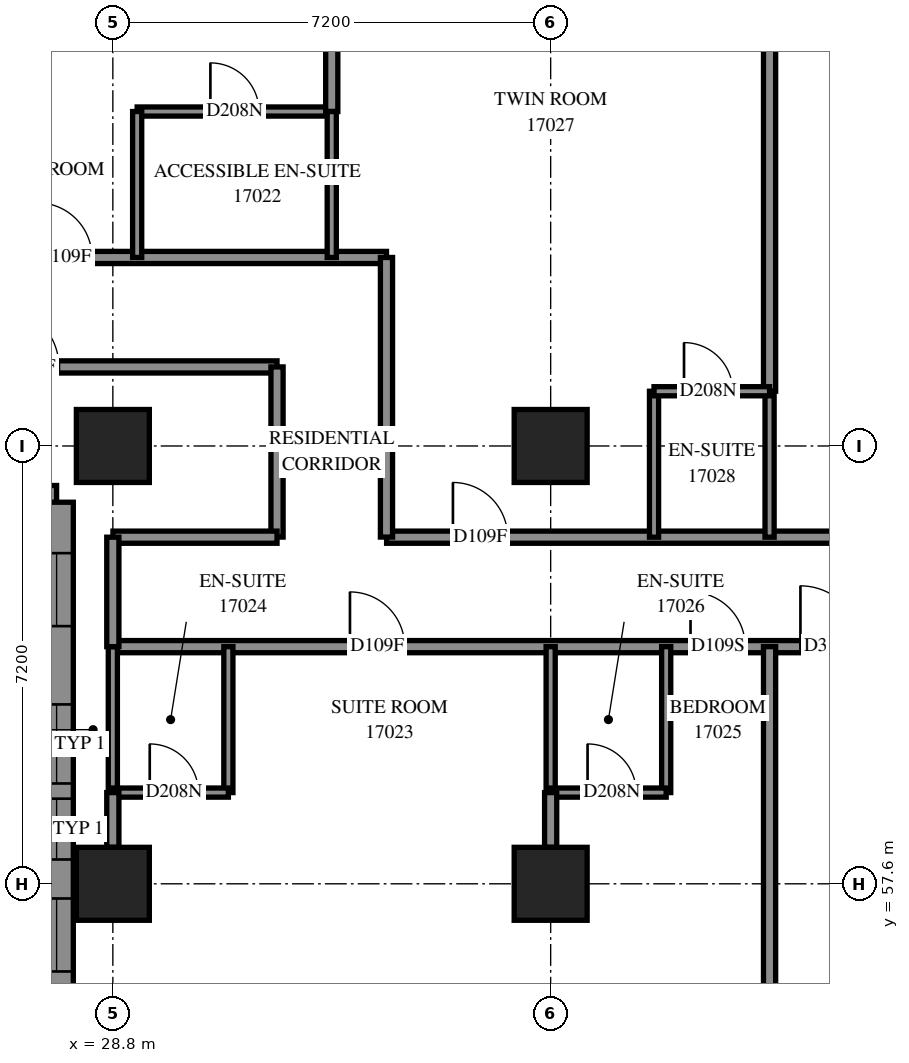
"""IFC4 building model, lengths in metres.
Left out: names, types, materials, properties, quantities, classifications, styles, units other than length and angle.
Written with IfcOpenShell. Run it as: python <this file> out.ifc"""

import sys

from ifc_helpers import new_model, si_unit, direction, frame, frame_2d, origin, origin_2d, place, context, subcontext, project, spatial, polyline, rectangle, outline, extrude, element, fill, save


model = new_model("IFC4")
c1 = context("Model", 3, precision=1e-05, world=origin(), true_north=direction((0.0, 1.0)))
c2 = subcontext(c1, "Body", "Model", "MODEL_VIEW")
j1 = project(units=[si_unit("LENGTHUNIT", "METRE"), si_unit("PLANEANGLEUNIT", "RADIAN")], contexts=[c1])
p1 = place(None, origin())
s1 = spatial("IfcSite", under=j1, at=p1, CompositionType="ELEMENT")
p2 = place(p1, origin())
s2 = spatial("IfcBuilding", under=s1, at=p2, CompositionType="ELEMENT")
p3 = place(p2, frame((0.0, 0.0, 64.4)))
s3 = spatial("IfcBuildingStorey", under=s2, at=p3, CompositionType="ELEMENT", Elevation=64.4)
for number, where, z_axis, x_axis in (
    (1, (28.8, 57.6, 0.0), (0.0, 0.0, 1.0), (1.0, 0.0, 0.0)),
    (2, (28.8, 64.8, 0.0), (0.0, 0.0, 1.0), (1.0, 0.0, 0.0)),
    (3, (36.0, 57.6, 0.0), (0.0, 0.0, 1.0), (1.0, 0.0, 0.0)),
    (4, (36.0, 64.8, 0.0), (0.0, 0.0, 1.0), (1.0, 0.0, 0.0)),
):
    element("IfcColumn", number, at=place(p3, frame(where, z_axis=z_axis, x_axis=x_axis)), inside=s3, PredefinedType="COLUMN", context=c2, shape_type="SweptSolid", body=[
        extrude(rectangle(XDim=1.2, YDim=1.2, at=origin_2d()), origin(), (0.0, 0.0, 1.0), 3.1),
    ])
p4 = place(p3, frame((19.442, 63.875, 0.0), z_axis=(0.0, 0.0, 1.0), x_axis=(1.0, 0.0, 0.0)))
e5 = element("IfcWall", 5, at=p4, inside=s3, PredefinedType="SOLIDWALL", context=c2, shape_type="SweptSolid", body=[
    extrude(outline(polyline([(-0.275, -0.275), (8.158, -0.275), (8.708, 0.275), (0.275, 0.275), (-0.275, -0.275)])), origin(), (0.0, 0.0, 1.0), 3.1),
])
p5 = place(p4, frame((2.558, 0.0, 0.5)))
e6 = element("IfcOpeningElement", 6, at=p5, cuts=e5, PredefinedType="OPENING", context=c2, shape_type="SweptSolid", body=[
    extrude(rectangle(XDim=2.8, YDim=2.45, at=frame_2d((1.4, 1.225))), frame((0.0, 0.285, 0.0), z_axis=(0.0, -1.0, 0.0), x_axis=(1.0, 0.0, 0.0)), (0.0, 0.0, 1.0), 0.57),
])
p6 = place(p4, frame((0.717, 0.0, 0.5)))
e7 = element("IfcOpeningElement", 7, at=p6, cuts=e5, PredefinedType="OPENING", context=c2, shape_type="SweptSolid", body=[
    extrude(rectangle(XDim=1.2, YDim=2.45, at=frame_2d((0.6, 1.225))), frame((0.0, 0.285, 0.0), z_axis=(0.0, -1.0, 0.0), x_axis=(1.0, 0.0, 0.0)), (0.0, 0.0, 1.0), 0.57),
])
p7 = place(p4, frame((6.396, 0.0, 0.5)))
e8 = element("IfcOpeningElement", 8, at=p7, cuts=e5, PredefinedType="OPENING", context=c2, shape_type="SweptSolid", body=[
    extrude(rectangle(XDim=1.2, YDim=2.45, at=frame_2d((0.6, 1.225))), frame((0.0, 0.285, 0.0), z_axis=(0.0, -1.0, 0.0), x_axis=(1.0, 0.0, 0.0)), (0.0, 0.0, 1.0), 0.57),
])
p8 = place(p3, frame((27.875, 63.875, 0.0), z_axis=(0.0, 0.0, 1.0), x_axis=(0.0, -1.0, 0.0)))
e9 = element("IfcWall", 9, at=p8, inside=s3, PredefinedType="SOLIDWALL", context=c2, shape_type="SweptSolid", body=[
    extrude(outline(polyline([(0.275, -0.275), (8.708, -0.275), (8.158, 0.275), (-0.275, 0.275), (0.275, -0.275)])), origin(), (0.0, 0.0, 1.0), 3.1),
])
p9 = place(p8, frame((0.838, 0.0, 0.5)))
e10 = element("IfcOpeningElement", 10, at=p9, cuts=e9, PredefinedType="OPENING", context=c2, shape_type="SweptSolid", body=[
    extrude(rectangle(XDim=1.2, YDim=2.45, at=frame_2d((0.6, 1.225))), frame((0.0, 0.285, 0.0), z_axis=(0.0, -1.0, 0.0), x_axis=(1.0, 0.0, 0.0)), (0.0, 0.0, 1.0), 0.57),
])
p10 = place(p8, frame((6.516, 0.0, 0.5)))
e11 = element("IfcOpeningElement", 11, at=p10, cuts=e9, PredefinedType="OPENING", context=c2, shape_type="SweptSolid", body=[
    extrude(rectangle(XDim=1.2, YDim=2.45, at=frame_2d((0.6, 1.225))), frame((0.0, 0.285, 0.0), z_axis=(0.0, -1.0, 0.0), x_axis=(1.0, 0.0, 0.0)), (0.0, 0.0, 1.0), 0.57),
])
p11 = place(p8, frame((3.325, 0.0, 0.45)))
e12 = element("IfcOpeningElement", 12, at=p11, cuts=e9, PredefinedType="OPENING", context=c2, shape_type="SweptSolid", body=[
    extrude(rectangle(XDim=1.3, YDim=2.5, at=frame_2d((0.65, 1.25))), frame((0.0, 0.285, 0.0), z_axis=(0.0, -1.0, 0.0), x_axis=(1.0, 0.0, 0.0)), (0.0, 0.0, 1.0), 0.57),
])
p12 = place(p8, frame((4.875, 0.0, 0.45)))
e13 = element("IfcOpeningElement", 13, at=p12, cuts=e9, PredefinedType="OPENING", context=c2, shape_type="SweptSolid", body=[
    extrude(rectangle(XDim=1.0, YDim=2.5, at=frame_2d((0.5, 1.25))), frame((0.0, 0.285, 0.0), z_axis=(0.0, -1.0, 0.0), x_axis=(1.0, 0.0, 0.0)), (0.0, 0.0, 1.0), 0.57),
])
p13 = place(p3, frame((28.8, 61.5, 0.0), z_axis=(0.0, 0.0, 1.0), x_axis=(1.0, 0.0, 0.0)))
e14 = element("IfcWall", 14, at=p13, inside=s3, PredefinedType="PARTITIONING", context=c2, shape_type="SweptSolid", body=[
    extrude(rectangle(XDim=24.3, YDim=0.2, at=frame_2d((12.15, 0.0))), origin(), (0.0, 0.0, 1.0), 3.1),
])
p14 = place(p13, frame((3.899, 0.0, 0.0)))
e15 = element("IfcOpeningElement", 15, at=p14, cuts=e14, PredefinedType="OPENING", context=c2, shape_type="SweptSolid", body=[
    extrude(rectangle(XDim=0.9, YDim=2.1, at=frame_2d((0.45, 1.05))), frame((0.0, 0.11, 0.0), z_axis=(0.0, -1.0, 0.0), x_axis=(1.0, 0.0, 0.0)), (0.0, 0.0, 1.0), 0.22),
])
p15 = place(p13, frame((9.5, 0.0, 0.0)))
e16 = element("IfcOpeningElement", 16, at=p15, cuts=e14, PredefinedType="OPENING", context=c2, shape_type="SweptSolid", body=[
    extrude(rectangle(XDim=0.9, YDim=2.1, at=frame_2d((0.45, 1.05))), frame((0.0, 0.11, 0.0), z_axis=(0.0, -1.0, 0.0), x_axis=(1.0, 0.0, 0.0)), (0.0, 0.0, 1.0), 0.22),
])
p16 = place(p13, frame((11.307, 0.0, 0.0)))
e17 = element("IfcOpeningElement", 17, at=p16, cuts=e14, PredefinedType="OPENING", context=c2, shape_type="SweptSolid", body=[
    extrude(rectangle(XDim=1.0, YDim=2.1, at=frame_2d((0.5, 1.05))), frame((0.0, 0.11, 0.0), z_axis=(0.0, -1.0, 0.0), x_axis=(1.0, 0.0, 0.0)), (0.0, 0.0, 1.0), 0.22),
])
p17 = place(p13, frame((16.7, 0.0, 0.0)))
e18 = element("IfcOpeningElement", 18, at=p17, cuts=e14, PredefinedType="OPENING", context=c2, shape_type="SweptSolid", body=[
    extrude(rectangle(XDim=0.9, YDim=2.1, at=frame_2d((0.45, 1.05))), frame((0.0, 0.11, 0.0), z_axis=(0.0, -1.0, 0.0), x_axis=(1.0, 0.0, 0.0)), (0.0, 0.0, 1.0), 0.22),
])
p18 = place(p13, frame((18.508, 0.0, 0.0)))
e19 = element("IfcOpeningElement", 19, at=p18, cuts=e14, PredefinedType="OPENING", context=c2, shape_type="SweptSolid", body=[
    extrude(rectangle(XDim=1.0, YDim=2.1, at=frame_2d((0.5, 1.05))), frame((0.0, 0.11, 0.0), z_axis=(0.0, -1.0, 0.0), x_axis=(1.0, 0.0, 0.0)), (0.0, 0.0, 1.0), 0.22),
])
p19 = place(p13, frame((23.033, 0.0, 0.0)))
e20 = element("IfcOpeningElement", 20, at=p19, cuts=e14, PredefinedType="OPENING", context=c2, shape_type="SweptSolid", body=[
    extrude(rectangle(XDim=1.0, YDim=2.1, at=frame_2d((0.5, 1.05))), frame((0.0, 0.11, 0.0), z_axis=(0.0, -1.0, 0.0), x_axis=(1.0, 0.0, 0.0)), (0.0, 0.0, 1.0), 0.22),
])
p20 = place(p3, frame((33.302, 63.3, 0.0), z_axis=(0.0, 0.0, 1.0), x_axis=(1.0, 0.0, 0.0)))
e21 = element("IfcWall", 21, at=p20, inside=s3, PredefinedType="PARTITIONING", context=c2, shape_type="SweptSolid", body=[
    extrude(rectangle(XDim=21.798, YDim=0.2, at=frame_2d((10.899, 0.0))), origin(), (0.0, 0.0, 1.0), 3.1),
])
p21 = place(p20, frame((1.091, 0.0, 0.0)))
e22 = element("IfcOpeningElement", 22, at=p21, cuts=e21, PredefinedType="OPENING", context=c2, shape_type="SweptSolid", body=[
    extrude(rectangle(XDim=0.9, YDim=2.1, at=frame_2d((0.45, 1.05))), frame((0.0, 0.11, 0.0), z_axis=(0.0, -1.0, 0.0), x_axis=(1.0, 0.0, 0.0)), (0.0, 0.0, 1.0), 0.22),
])
p22 = place(p20, frame((8.248, 0.0, 0.0)))
e23 = element("IfcOpeningElement", 23, at=p22, cuts=e21, PredefinedType="OPENING", context=c2, shape_type="SweptSolid", body=[
    extrude(rectangle(XDim=0.9, YDim=2.1, at=frame_2d((0.45, 1.05))), frame((0.0, 0.11, 0.0), z_axis=(0.0, -1.0, 0.0), x_axis=(1.0, 0.0, 0.0)), (0.0, 0.0, 1.0), 0.22),
])
p23 = place(p20, frame((15.448, 0.0, 0.0)))
e24 = element("IfcOpeningElement", 24, at=p23, cuts=e21, PredefinedType="OPENING", context=c2, shape_type="SweptSolid", body=[
    extrude(rectangle(XDim=0.9, YDim=2.1, at=frame_2d((0.45, 1.05))), frame((0.0, 0.11, 0.0), z_axis=(0.0, -1.0, 0.0), x_axis=(1.0, 0.0, 0.0)), (0.0, 0.0, 1.0), 0.22),
])
p24 = place(p3, frame((21.602, 67.9, 0.0), z_axis=(0.0, 0.0, 1.0), x_axis=(1.0, 0.0, 0.0)))
e25 = element("IfcWall", 25, at=p24, inside=s3, PredefinedType="PARTITIONING", context=c2, shape_type="SweptSolid", body=[
    extrude(rectangle(XDim=11.698, YDim=0.2, at=frame_2d((5.849, 0.0))), origin(), (0.0, 0.0, 1.0), 3.1),
])
p25 = place(p24, frame((5.955, 0.0, 0.0)))
e26 = element("IfcOpeningElement", 26, at=p25, cuts=e25, PredefinedType="OPENING", context=c2, shape_type="SweptSolid", body=[
    extrude(rectangle(XDim=0.9, YDim=2.1, at=frame_2d((0.45, 1.05))), frame((0.0, 0.11, 0.0), z_axis=(0.0, -1.0, 0.0), x_axis=(1.0, 0.0, 0.0)), (0.0, 0.0, 1.0), 0.22),
])
p26 = place(p3, frame((21.6, 66.1, 0.0), z_axis=(0.0, 0.0, 1.0), x_axis=(1.0, 0.0, 0.0)))
e27 = element("IfcWall", 27, at=p26, inside=s3, PredefinedType="PARTITIONING", context=c2, shape_type="SweptSolid", body=[
    extrude(rectangle(XDim=9.9, YDim=0.2, at=frame_2d((4.95, 0.0))), origin(), (0.0, 0.0, 1.0), 3.1),
])
p27 = place(p26, frame((5.314, 0.0, 0.0)))
e28 = element("IfcOpeningElement", 28, at=p27, cuts=e27, PredefinedType="OPENING", context=c2, shape_type="SweptSolid", body=[
    extrude(rectangle(XDim=1.0, YDim=2.1, at=frame_2d((0.5, 1.05))), frame((0.0, 0.11, 0.0), z_axis=(0.0, -1.0, 0.0), x_axis=(1.0, 0.0, 0.0)), (0.0, 0.0, 1.0), 0.22),
])
p28 = place(p3, frame((39.6, 65.7, 0.0), z_axis=(0.0, 0.0, 1.0), x_axis=(0.0, 1.0, 0.0)))
e29 = element("IfcWall", 29, at=p28, inside=s3, PredefinedType="PARTITIONING", context=c2, shape_type="SweptSolid", body=[
    extrude(rectangle(XDim=7.168, YDim=0.2, at=frame_2d((3.584, 0.0))), origin(), (0.0, 0.0, 1.0), 3.1),
])
p29 = place(p3, frame((39.6, 55.717, 0.0), z_axis=(0.0, 0.0, 1.0), x_axis=(0.0, 1.0, 0.0)))
e30 = element("IfcWall", 30, at=p29, inside=s3, PredefinedType="PARTITIONING", context=c2, shape_type="SweptSolid", body=[
    extrude(rectangle(XDim=5.783, YDim=0.2, at=frame_2d((2.892, 0.0))), origin(), (0.0, 0.0, 1.0), 3.1),
])
p30 = place(p3, frame((33.3, 63.302, 0.0), z_axis=(0.0, 0.0, 1.0), x_axis=(0.0, 1.0, 0.0)))
e31 = element("IfcWall", 31, at=p30, inside=s3, PredefinedType="PARTITIONING", context=c2, shape_type="SweptSolid", body=[
    extrude(rectangle(XDim=4.598, YDim=0.2, at=frame_2d((2.299, 0.0))), origin(), (0.0, 0.0, 1.0), 3.1),
])
p31 = place(p3, frame((29.2, 70.3, 0.0), z_axis=(0.0, 0.0, 1.0), x_axis=(1.0, 0.0, 0.0)))
e32 = element("IfcWall", 32, at=p31, inside=s3, PredefinedType="PARTITIONING", context=c2, shape_type="SweptSolid", body=[
    extrude(rectangle(XDim=3.2, YDim=0.15, at=frame_2d((1.6, 0.0))), origin(), (0.0, 0.0, 1.0), 3.1),
])
p32 = place(p31, frame((1.204, 0.0, 0.0)))
e33 = element("IfcOpeningElement", 33, at=p32, cuts=e32, PredefinedType="OPENING", context=c2, shape_type="SweptSolid", body=[
    extrude(rectangle(XDim=0.8, YDim=2.1, at=frame_2d((0.4, 1.05))), frame((0.0, 0.085, 0.0), z_axis=(0.0, -1.0, 0.0), x_axis=(1.0, 0.0, 0.0)), (0.0, 0.0, 1.0), 0.17),
])
p33 = place(p3, frame((31.5, 63.302, 0.0), z_axis=(0.0, 0.0, 1.0), x_axis=(0.0, 1.0, 0.0)))
e34 = element("IfcWall", 34, at=p33, inside=s3, PredefinedType="PARTITIONING", context=c2, shape_type="SweptSolid", body=[
    extrude(rectangle(XDim=2.798, YDim=0.2, at=frame_2d((1.399, 0.0))), origin(), (0.0, 0.0, 1.0), 3.1),
])
p34 = place(p3, frame((28.802, 63.3, 0.0), z_axis=(0.0, 0.0, 1.0), x_axis=(1.0, 0.0, 0.0)))
e35 = element("IfcWall", 35, at=p34, inside=s3, PredefinedType="PARTITIONING", context=c2, shape_type="SweptSolid", body=[
    extrude(rectangle(XDim=2.698, YDim=0.2, at=frame_2d((1.349, 0.0))), origin(), (0.0, 0.0, 1.0), 3.1),
])
p35 = place(p3, frame((32.4, 70.3, 0.0), z_axis=(0.0, 0.0, 1.0), x_axis=(0.0, 1.0, 0.0)))
e36 = element("IfcWall", 36, at=p35, inside=s3, PredefinedType="PARTITIONING", context=c2, shape_type="SweptSolid", body=[
    extrude(rectangle(XDim=2.639, YDim=0.2, at=frame_2d((1.32, 0.0))), origin(), (0.0, 0.0, 1.0), 3.1),
])
for number, where, z_axis, x_axis in (
    (37, (37.7, 63.3, 0.0), (0.0, 0.0, 1.0), (0.0, 1.0, 0.0)),
    (38, (39.6, 63.3, 0.0), (0.0, 0.0, 1.0), (0.0, 1.0, 0.0)),
    (39, (30.7, 59.1, 0.0), (0.0, 0.0, 1.0), (0.0, 1.0, 0.0)),
):
    element("IfcWall", number, at=place(p3, frame(where, z_axis=z_axis, x_axis=x_axis)), inside=s3, PredefinedType="PARTITIONING", context=c2, shape_type="SweptSolid", body=[
        extrude(rectangle(XDim=2.4, YDim=0.15, at=frame_2d((1.2, 0.0))), origin(), (0.0, 0.0, 1.0), 3.1),
    ])
p36 = place(p3, frame((28.8, 59.1, 0.0), z_axis=(0.0, 0.0, 1.0), x_axis=(0.0, 1.0, 0.0)))
e40 = element("IfcWall", 40, at=p36, inside=s3, PredefinedType="PARTITIONING", context=c2, shape_type="SweptSolid", body=[
    extrude(rectangle(XDim=2.4, YDim=0.15, at=frame_2d((1.2, 0.0))), origin(), (0.0, 0.0, 1.0), 2.6),
])
for number, where, z_axis, x_axis in (
    (41, (37.9, 59.1, 0.0), (0.0, 0.0, 1.0), (0.0, 1.0, 0.0)),
    (42, (36.0, 59.1, 0.0), (0.0, 0.0, 1.0), (0.0, 1.0, 0.0)),
    (43, (29.2, 67.9, 0.0), (0.0, 0.0, 1.0), (0.0, 1.0, 0.0)),
    (44, (32.4, 67.9, 0.0), (0.0, 0.0, 1.0), (0.0, 1.0, 0.0)),
):
    element("IfcWall", number, at=place(p3, frame(where, z_axis=z_axis, x_axis=x_axis)), inside=s3, PredefinedType="PARTITIONING", context=c2, shape_type="SweptSolid", body=[
        extrude(rectangle(XDim=2.4, YDim=0.15, at=frame_2d((1.2, 0.0))), origin(), (0.0, 0.0, 1.0), 3.1),
    ])
p37 = place(p3, frame((28.8, 59.1, 0.0), z_axis=(0.0, 0.0, 1.0), x_axis=(1.0, 0.0, 0.0)))
e45 = element("IfcWall", 45, at=p37, inside=s3, PredefinedType="PARTITIONING", context=c2, shape_type="SweptSolid", body=[
    extrude(rectangle(XDim=1.9, YDim=0.15, at=frame_2d((0.95, 0.0))), origin(), (0.0, 0.0, 1.0), 3.1),
])
p38 = place(p37, frame((0.607, 0.0, 0.0)))
e46 = element("IfcOpeningElement", 46, at=p38, cuts=e45, PredefinedType="OPENING", context=c2, shape_type="SweptSolid", body=[
    extrude(rectangle(XDim=0.8, YDim=2.1, at=frame_2d((0.4, 1.05))), frame((0.0, 0.085, 0.0), z_axis=(0.0, -1.0, 0.0), x_axis=(1.0, 0.0, 0.0)), (0.0, 0.0, 1.0), 0.17),
])
p39 = place(p3, frame((36.0, 59.1, 0.0), z_axis=(0.0, 0.0, 1.0), x_axis=(1.0, 0.0, 0.0)))
e47 = element("IfcWall", 47, at=p39, inside=s3, PredefinedType="PARTITIONING", context=c2, shape_type="SweptSolid", body=[
    extrude(rectangle(XDim=1.9, YDim=0.15, at=frame_2d((0.95, 0.0))), origin(), (0.0, 0.0, 1.0), 3.1),
])
p40 = place(p39, frame((0.607, 0.0, 0.0)))
e48 = element("IfcOpeningElement", 48, at=p40, cuts=e47, PredefinedType="OPENING", context=c2, shape_type="SweptSolid", body=[
    extrude(rectangle(XDim=0.8, YDim=2.1, at=frame_2d((0.4, 1.05))), frame((0.0, 0.085, 0.0), z_axis=(0.0, -1.0, 0.0), x_axis=(1.0, 0.0, 0.0)), (0.0, 0.0, 1.0), 0.17),
])
p41 = place(p3, frame((37.7, 65.7, 0.0), z_axis=(0.0, 0.0, 1.0), x_axis=(1.0, 0.0, 0.0)))
e49 = element("IfcWall", 49, at=p41, inside=s3, PredefinedType="PARTITIONING", context=c2, shape_type="SweptSolid", body=[
    extrude(rectangle(XDim=1.9, YDim=0.15, at=frame_2d((0.95, 0.0))), origin(), (0.0, 0.0, 1.0), 3.1),
])
p42 = place(p41, frame((0.493, 0.0, 0.0)))
e50 = element("IfcOpeningElement", 50, at=p42, cuts=e49, PredefinedType="OPENING", context=c2, shape_type="SweptSolid", body=[
    extrude(rectangle(XDim=0.8, YDim=2.1, at=frame_2d((0.4, 1.05))), frame((0.0, 0.085, 0.0), z_axis=(0.0, -1.0, 0.0), x_axis=(1.0, 0.0, 0.0)), (0.0, 0.0, 1.0), 0.17),
])
p43 = place(p3, frame((28.8, 61.5, 0.0), z_axis=(0.0, 0.0, 1.0), x_axis=(0.0, 1.0, 0.0)))
e51 = element("IfcWall", 51, at=p43, inside=s3, PredefinedType="PARTITIONING", context=c2, shape_type="SweptSolid", body=[
    extrude(rectangle(XDim=1.8, YDim=0.2, at=frame_2d((0.9, 0.0))), origin(), (0.0, 0.0, 1.0), 2.6),
])
p44 = place(p3, frame((28.8, 58.2, 0.0), z_axis=(0.0, 0.0, 1.0), x_axis=(0.0, 1.0, 0.0)))
e52 = element("IfcWall", 52, at=p44, inside=s3, PredefinedType="PARTITIONING", context=c2, shape_type="SweptSolid", body=[
    extrude(rectangle(XDim=0.9, YDim=0.2, at=frame_2d((0.45, 0.0))), origin(), (0.0, 0.0, 1.0), 2.6),
])
p45 = place(p3, frame((36.0, 58.2, 0.0), z_axis=(0.0, 0.0, 1.0), x_axis=(0.0, 1.0, 0.0)))
e53 = element("IfcWall", 53, at=p45, inside=s3, PredefinedType="PARTITIONING", context=c2, shape_type="SweptSolid", body=[
    extrude(rectangle(XDim=0.9, YDim=0.2, at=frame_2d((0.45, 0.0))), origin(), (0.0, 0.0, 1.0), 3.1),
])
p46 = place(p9, origin())
e54 = element("IfcWindow", 54, at=p46, inside=s3, PartitioningType="SINGLE_PANEL", PredefinedType="WINDOW", context=c2, shape_type="SweptSolid", body=[
    extrude(rectangle(XDim=1.2, YDim=2.45, at=frame_2d((0.6, 1.225))), frame((0.0, 0.155, 0.0), z_axis=(0.0, -1.0, 0.0), x_axis=(1.0, 0.0, 0.0)), (0.0, 0.0, 1.0), 0.06),
])
fill(e10, e54)
p47 = place(p10, origin())
e55 = element("IfcWindow", 55, at=p47, inside=s3, PartitioningType="SINGLE_PANEL", PredefinedType="WINDOW", context=c2, shape_type="SweptSolid", body=[
    extrude(rectangle(XDim=1.2, YDim=2.45, at=frame_2d((0.6, 1.225))), frame((0.0, 0.155, 0.0), z_axis=(0.0, -1.0, 0.0), x_axis=(1.0, 0.0, 0.0)), (0.0, 0.0, 1.0), 0.06),
])
fill(e11, e55)
p48 = place(p27, origin())
e56 = element("IfcDoor", 56, at=p48, inside=s3, OperationType="SINGLE_SWING_LEFT", PredefinedType="DOOR", context=c2, shape_type="SweptSolid", body=[
    extrude(rectangle(XDim=1.0, YDim=2.1, at=frame_2d((0.5, 1.05))), frame((0.0, 0.025, 0.0), z_axis=(0.0, -1.0, 0.0), x_axis=(1.0, 0.0, 0.0)), (0.0, 0.0, 1.0), 0.05),
])
fill(e28, e56)
p49 = place(p25, origin())
e57 = element("IfcDoor", 57, at=p49, inside=s3, OperationType="SINGLE_SWING_LEFT", PredefinedType="DOOR", context=c2, shape_type="SweptSolid", body=[
    extrude(rectangle(XDim=0.9, YDim=2.1, at=frame_2d((0.45, 1.05))), frame((0.0, 0.025, 0.0), z_axis=(0.0, -1.0, 0.0), x_axis=(1.0, 0.0, 0.0)), (0.0, 0.0, 1.0), 0.05),
])
fill(e26, e57)
p50 = place(p32, origin())
e58 = element("IfcDoor", 58, at=p50, inside=s3, OperationType="SINGLE_SWING_RIGHT", PredefinedType="DOOR", context=c2, shape_type="SweptSolid", body=[
    extrude(rectangle(XDim=0.8, YDim=2.1, at=frame_2d((0.4, 1.05))), frame((0.0, 0.025, 0.0), z_axis=(0.0, -1.0, 0.0), x_axis=(1.0, 0.0, 0.0)), (0.0, 0.0, 1.0), 0.05),
])
fill(e33, e58)
p51 = place(p14, origin())
e59 = element("IfcDoor", 59, at=p51, inside=s3, OperationType="SINGLE_SWING_LEFT", PredefinedType="DOOR", context=c2, shape_type="SweptSolid", body=[
    extrude(rectangle(XDim=0.9, YDim=2.1, at=frame_2d((0.45, 1.05))), frame((0.0, 0.025, 0.0), z_axis=(0.0, -1.0, 0.0), x_axis=(1.0, 0.0, 0.0)), (0.0, 0.0, 1.0), 0.05),
])
fill(e15, e59)
p52 = place(p38, origin())
e60 = element("IfcDoor", 60, at=p52, inside=s3, OperationType="SINGLE_SWING_RIGHT", PredefinedType="DOOR", context=c2, shape_type="SweptSolid", body=[
    extrude(rectangle(XDim=0.8, YDim=2.1, at=frame_2d((0.4, 1.05))), frame((0.0, 0.025, 0.0), z_axis=(0.0, -1.0, 0.0), x_axis=(1.0, 0.0, 0.0)), (0.0, 0.0, 1.0), 0.05),
])
fill(e46, e60)
p53 = place(p15, origin())
e61 = element("IfcDoor", 61, at=p53, inside=s3, OperationType="SINGLE_SWING_LEFT", PredefinedType="DOOR", context=c2, shape_type="SweptSolid", body=[
    extrude(rectangle(XDim=0.9, YDim=2.1, at=frame_2d((0.45, 1.05))), frame((0.0, 0.025, 0.0), z_axis=(0.0, -1.0, 0.0), x_axis=(1.0, 0.0, 0.0)), (0.0, 0.0, 1.0), 0.05),
])
fill(e16, e61)
p54 = place(p40, origin())
e62 = element("IfcDoor", 62, at=p54, inside=s3, OperationType="SINGLE_SWING_RIGHT", PredefinedType="DOOR", context=c2, shape_type="SweptSolid", body=[
    extrude(rectangle(XDim=0.8, YDim=2.1, at=frame_2d((0.4, 1.05))), frame((0.0, 0.025, 0.0), z_axis=(0.0, -1.0, 0.0), x_axis=(1.0, 0.0, 0.0)), (0.0, 0.0, 1.0), 0.05),
])
fill(e48, e62)
p55 = place(p21, origin())
e63 = element("IfcDoor", 63, at=p55, inside=s3, OperationType="SINGLE_SWING_LEFT", PredefinedType="DOOR", context=c2, shape_type="SweptSolid", body=[
    extrude(rectangle(XDim=0.9, YDim=2.1, at=frame_2d((0.45, 1.05))), frame((0.0, 0.025, 0.0), z_axis=(0.0, -1.0, 0.0), x_axis=(1.0, 0.0, 0.0)), (0.0, 0.0, 1.0), 0.05),
])
fill(e22, e63)
p56 = place(p42, origin())
e64 = element("IfcDoor", 64, at=p56, inside=s3, OperationType="SINGLE_SWING_RIGHT", PredefinedType="DOOR", context=c2, shape_type="SweptSolid", body=[
    extrude(rectangle(XDim=0.8, YDim=2.1, at=frame_2d((0.4, 1.05))), frame((0.0, 0.025, 0.0), z_axis=(0.0, -1.0, 0.0), x_axis=(1.0, 0.0, 0.0)), (0.0, 0.0, 1.0), 0.05),
])
fill(e50, e64)
p57 = place(p16, origin())
e65 = element("IfcDoor", 65, at=p57, inside=s3, OperationType="SINGLE_SWING_RIGHT", PredefinedType="DOOR", context=c2, shape_type="SweptSolid", body=[
    extrude(rectangle(XDim=1.0, YDim=2.1, at=frame_2d((0.5, 1.05))), frame((0.0, 0.025, 0.0), z_axis=(0.0, -1.0, 0.0), x_axis=(1.0, 0.0, 0.0)), (0.0, 0.0, 1.0), 0.05),
])
fill(e17, e65)
p58 = place(p11, origin())
e66 = element("IfcWindow", 66, at=p58, inside=s3, PartitioningType="SINGLE_PANEL", PredefinedType="WINDOW", context=c2, shape_type="SweptSolid", body=[
    extrude(rectangle(XDim=1.3, YDim=2.5, at=frame_2d((0.65, 1.25))), frame((0.0, 0.155, 0.0), z_axis=(0.0, -1.0, 0.0), x_axis=(1.0, 0.0, 0.0)), (0.0, 0.0, 1.0), 0.06),
])
fill(e12, e66)
p59 = place(p12, origin())
e67 = element("IfcWindow", 67, at=p59, inside=s3, PartitioningType="SINGLE_PANEL", PredefinedType="WINDOW", context=c2, shape_type="SweptSolid", body=[
    extrude(rectangle(XDim=1.0, YDim=2.5, at=frame_2d((0.5, 1.25))), frame((0.0, 0.155, 0.0), z_axis=(0.0, -1.0, 0.0), x_axis=(1.0, 0.0, 0.0)), (0.0, 0.0, 1.0), 0.06),
])
fill(e13, e67)
save(model, sys.argv[1])
